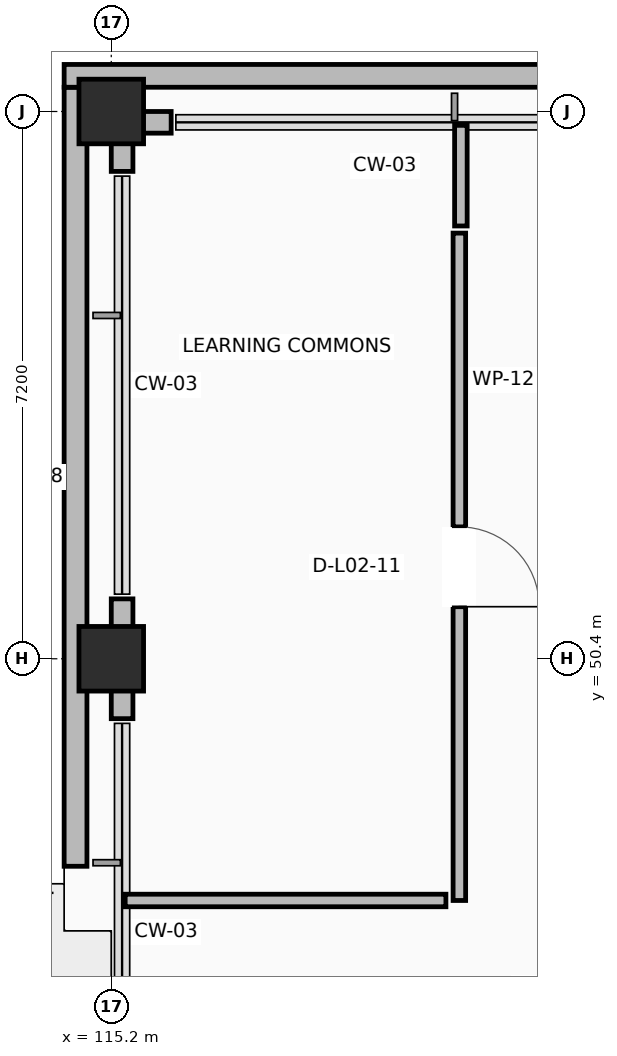
"""IFC4 building model, lengths in metres.
Left out: names, types, materials, properties, quantities, classifications, styles, units other than length and angle.
Written with IfcOpenShell. Run it as: python <this file> out.ifc"""

import sys

from ifc_helpers import new_model, si_unit, direction, frame, frame_2d, origin, origin_2d, place, context, subcontext, project, spatial, rectangle, extrude, element, fill, save


model = new_model("IFC4")
c1 = context("Model", 3, precision=1e-05, world=origin(), true_north=direction((0.0, 1.0)))
c2 = subcontext(c1, "Body", "Model", "MODEL_VIEW")
j1 = project(units=[si_unit("LENGTHUNIT", "METRE"), si_unit("PLANEANGLEUNIT", "RADIAN")], contexts=[c1])
p1 = place(None, origin())
s1 = spatial("IfcSite", under=j1, at=p1, CompositionType="ELEMENT")
p2 = place(p1, origin())
s2 = spatial("IfcBuilding", under=s1, at=p2, CompositionType="ELEMENT")
p3 = place(p2, frame((0.0, 0.0, 9.0)))
s3 = spatial("IfcBuildingStorey", under=s2, at=p3, CompositionType="ELEMENT", Elevation=9.0)
for number, where, z_axis, x_axis in (
    (1, (115.2, 50.4, 0.0), (0.0, 0.0, 1.0), (1.0, 0.0, 0.0)),
    (2, (115.2, 57.6, 0.0), (0.0, 0.0, 1.0), (1.0, 0.0, 0.0)),
):
    element("IfcColumn", number, at=place(p3, frame(where, z_axis=z_axis, x_axis=x_axis)), inside=s3, PredefinedType="COLUMN", context=c2, shape_type="SweptSolid", body=[
        extrude(rectangle(XDim=0.85, YDim=0.85, at=origin_2d()), origin(), (0.0, 0.0, 1.0), 4.22),
    ])
p4 = place(p3, frame((115.988, 57.458, 0.0), z_axis=(0.0, 0.0, 1.0), x_axis=(-1.0, 0.0, 0.0)))
e3 = element("IfcWall", 3, at=p4, inside=s3, PredefinedType="STANDARD", context=c2, shape_type="SweptSolid", body=[
    extrude(rectangle(XDim=0.788, YDim=0.285, at=frame_2d((0.394, 0.0))), origin(), (0.0, 0.0, 1.0), 3.26),
])
p5 = place(p3, frame((115.343, 57.315, 0.0), z_axis=(0.0, 0.0, 1.0), x_axis=(0.0, -1.0, 0.0)))
e4 = element("IfcWall", 4, at=p5, inside=s3, PredefinedType="STANDARD", context=c2, shape_type="SweptSolid", body=[
    extrude(rectangle(XDim=0.503, YDim=0.285, at=frame_2d((0.251, 0.0))), origin(), (0.0, 0.0, 1.0), 3.26),
])
p6 = place(p3, frame((115.343, 51.188, 0.0), z_axis=(0.0, 0.0, 1.0), x_axis=(0.0, -1.0, 0.0)))
e5 = element("IfcWall", 5, at=p6, inside=s3, PredefinedType="STANDARD", context=c2, shape_type="SweptSolid", body=[
    extrude(rectangle(XDim=1.576, YDim=0.285, at=frame_2d((0.788, 0.0))), origin(), (0.0, 0.0, 1.0), 3.26),
])
p7 = place(p3, frame((114.73, 47.67, 0.0), z_axis=(0.0, 0.0, 1.0), x_axis=(0.0, 1.0, 0.0)))
e6 = element("IfcWall", 6, at=p7, inside=s3, PredefinedType="PARAPET", context=c2, shape_type="SweptSolid", body=[
    extrude(rectangle(XDim=10.249, YDim=0.3, at=frame_2d((5.125, 0.0))), origin(), (0.0, 0.0, 1.0), 1.18),
])
p8 = place(p3, frame((114.58, 58.069, 0.0), z_axis=(0.0, 0.0, 1.0), x_axis=(1.0, 0.0, 0.0)))
e7 = element("IfcWall", 7, at=p8, inside=s3, PredefinedType="PARAPET", context=c2, shape_type="SweptSolid", body=[
    extrude(rectangle(XDim=46.89, YDim=0.3, at=frame_2d((23.445, 0.0))), origin(), (0.0, 0.0, 1.0), 1.18),
])
p9 = place(p3, frame((119.78, 56.0, 0.0), z_axis=(0.0, 0.0, 1.0), x_axis=(0.0, -1.0, 0.0)))
e8 = element("IfcWall", 8, at=p9, inside=s3, PredefinedType="PARTITIONING", context=c2, shape_type="SweptSolid", body=[
    extrude(rectangle(XDim=8.78, YDim=0.165, at=frame_2d((4.39, 0.0))), origin(), (0.0, 0.0, 1.0), 3.26),
])
p10 = place(p9, frame((3.865, 0.0, 0.0)))
e9 = element("IfcOpeningElement", 9, at=p10, cuts=e8, PredefinedType="OPENING", context=c2, shape_type="SweptSolid", body=[
    extrude(rectangle(XDim=1.05, YDim=2.15, at=frame_2d((0.525, 1.075))), frame((0.0, 0.093, 0.0), z_axis=(0.0, -1.0, 0.0), x_axis=(1.0, 0.0, 0.0)), (0.0, 0.0, 1.0), 0.185),
])
p11 = place(p3, frame((119.603, 47.22, 0.0), z_axis=(0.0, 0.0, 1.0), x_axis=(-1.0, 0.0, 0.0)))
e10 = element("IfcWall", 10, at=p11, inside=s3, PredefinedType="PARTITIONING", context=c2, shape_type="SweptSolid", body=[
    extrude(rectangle(XDim=4.22, YDim=0.165, at=frame_2d((2.11, 0.0))), origin(), (0.0, 0.0, 1.0), 3.26),
])
p12 = place(p3, frame((119.8, 57.418, 0.0), z_axis=(0.0, 0.0, 1.0), x_axis=(0.0, -1.0, 0.0)))
e11 = element("IfcWall", 11, at=p12, inside=s3, PredefinedType="PARTITIONING", context=c2, shape_type="SweptSolid", body=[
    extrude(rectangle(XDim=1.324, YDim=0.165, at=frame_2d((0.662, 0.0))), origin(), (0.0, 0.0, 1.0), 3.26),
])
p13 = place(p10, origin())
e12 = element("IfcDoor", 12, at=p13, inside=s3, OperationType="SINGLE_SWING_RIGHT", PredefinedType="DOOR", context=c2, shape_type="SweptSolid", body=[
    extrude(rectangle(XDim=1.05, YDim=2.15, at=frame_2d((0.525, 1.075))), frame((0.0, 0.025, 0.0), z_axis=(0.0, -1.0, 0.0), x_axis=(1.0, 0.0, 0.0)), (0.0, 0.0, 1.0), 0.05),
])
fill(e9, e12)
save(model, sys.argv[1])
